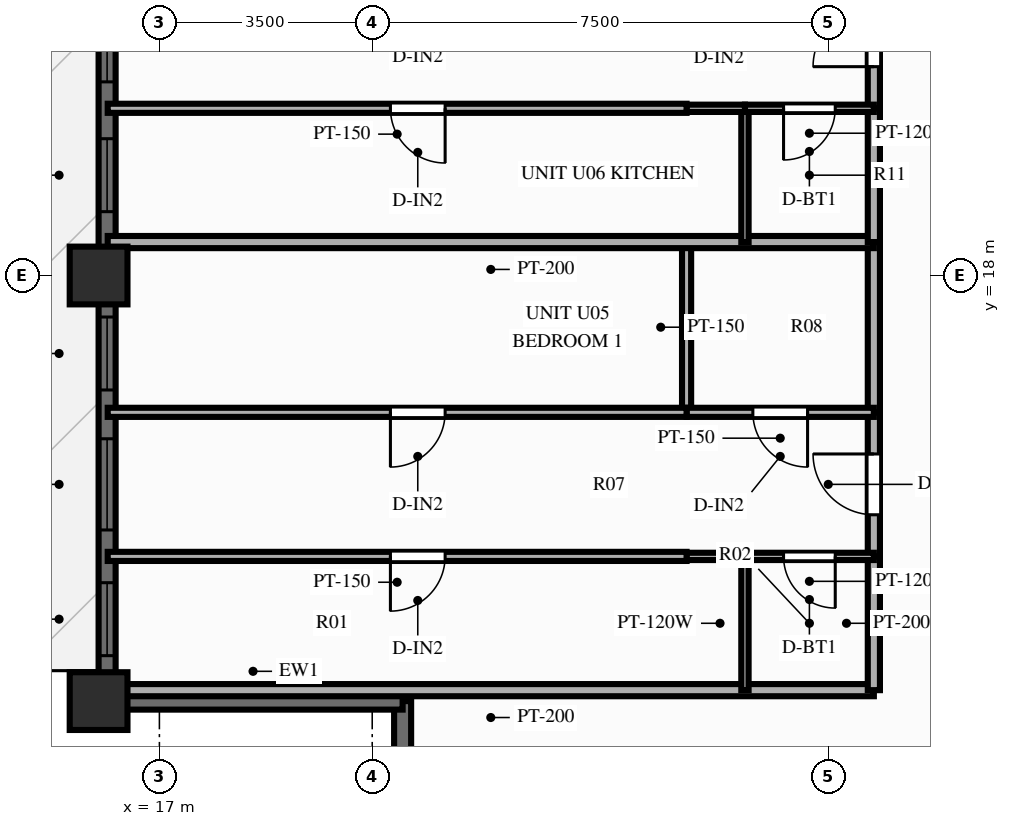
"""IFC4 building model, lengths in metres.
Left out: names, types, materials, properties, quantities, classifications, styles, units other than length and angle.
Written with IfcOpenShell. Run it as: python <this file> out.ifc"""

import sys

from ifc_helpers import new_model, si_unit, direction, frame, frame_2d, origin, origin_2d, place, context, subcontext, project, spatial, rectangle, extrude, source, transform, mapped, element, fill, save


model = new_model("IFC4")
c1 = context("Model", 3, precision=1e-05, world=origin(), true_north=direction((0.0, 1.0)))
c2 = subcontext(c1, "Body", "Model", "MODEL_VIEW")
j1 = project(units=[si_unit("LENGTHUNIT", "METRE"), si_unit("PLANEANGLEUNIT", "RADIAN")], contexts=[c1])
p1 = place(None, origin())
s1 = spatial("IfcSite", under=j1, at=p1, CompositionType="ELEMENT")
p2 = place(p1, origin())
s2 = spatial("IfcBuilding", under=s1, at=p2, CompositionType="ELEMENT")
p3 = place(p2, frame((0.0, 0.0, 159.1)))
s3 = spatial("IfcBuildingStorey", under=s2, at=p3, CompositionType="ELEMENT", Elevation=159.1)
m1 = source(origin(), c2, "Body", "SweptSolid", [
    extrude(rectangle(XDim=0.95, YDim=0.95, at=origin_2d()), origin(), (0.0, 0.0, 1.0), 3.9),
])
for number, where, z_axis, x_axis in (
    (1, (16.0, 18.0, 0.0), (0.0, 0.0, 1.0), (1.0, 0.0, 0.0)),
    (2, (16.0, 11.0, 0.0), (0.0, 0.0, 1.0), (1.0, 0.0, 0.0)),
):
    element("IfcColumn", number, at=place(p3, frame(where, z_axis=z_axis, x_axis=x_axis)), inside=s3, PredefinedType="COLUMN", context=c2, shape_type="MappedRepresentation", body=[
        mapped(m1, transform((0.0, 0.0, 0.0), scale=1.0)),
    ])
p4 = place(p3, frame((16.14, 11.0, 0.0), z_axis=(0.0, 0.0, 1.0), x_axis=(0.0, 1.0, 0.0)))
e3 = element("IfcWall", 3, at=p4, inside=s3, PredefinedType="SOLIDWALL", context=c2, shape_type="SweptSolid", body=[
    extrude(rectangle(XDim=32.0, YDim=0.28, at=frame_2d((16.0, 0.0))), origin(), (0.0, 0.0, 1.0), 2.79),
])
p5 = place(p4, frame((0.748, 0.0, 0.85)))
e4 = element("IfcOpeningElement", 4, at=p5, cuts=e3, PredefinedType="OPENING", context=c2, shape_type="SweptSolid", body=[
    extrude(rectangle(XDim=1.2, YDim=1.5, at=frame_2d((0.6, 0.75))), frame((0.0, 0.152, 0.0), z_axis=(0.0, -1.0, 0.0), x_axis=(1.0, 0.0, 0.0)), (0.0, 0.0, 1.0), 0.304),
])
p6 = place(p4, frame((2.815, 0.0, 0.85)))
e5 = element("IfcOpeningElement", 5, at=p6, cuts=e3, PredefinedType="OPENING", context=c2, shape_type="SweptSolid", body=[
    extrude(rectangle(XDim=1.5, YDim=1.65, at=frame_2d((0.75, 0.825))), frame((0.0, 0.152, 0.0), z_axis=(0.0, -1.0, 0.0), x_axis=(1.0, 0.0, 0.0)), (0.0, 0.0, 1.0), 0.304),
])
p7 = place(p4, frame((5.117, 0.0, 0.85)))
e6 = element("IfcOpeningElement", 6, at=p7, cuts=e3, PredefinedType="OPENING", context=c2, shape_type="SweptSolid", body=[
    extrude(rectangle(XDim=1.2, YDim=1.5, at=frame_2d((0.6, 0.75))), frame((0.0, 0.152, 0.0), z_axis=(0.0, -1.0, 0.0), x_axis=(1.0, 0.0, 0.0)), (0.0, 0.0, 1.0), 0.304),
])
p8 = place(p4, frame((8.05, 0.0, 0.85)))
e7 = element("IfcOpeningElement", 7, at=p8, cuts=e3, PredefinedType="OPENING", context=c2, shape_type="SweptSolid", body=[
    extrude(rectangle(XDim=1.2, YDim=1.5, at=frame_2d((0.6, 0.75))), frame((0.0, 0.152, 0.0), z_axis=(0.0, -1.0, 0.0), x_axis=(1.0, 0.0, 0.0)), (0.0, 0.0, 1.0), 0.304),
])
p9 = place(p4, frame((10.185, 0.0, 0.85)))
e8 = element("IfcOpeningElement", 8, at=p9, cuts=e3, PredefinedType="OPENING", context=c2, shape_type="SweptSolid", body=[
    extrude(rectangle(XDim=1.5, YDim=1.65, at=frame_2d((0.75, 0.825))), frame((0.0, 0.152, 0.0), z_axis=(0.0, -1.0, 0.0), x_axis=(1.0, 0.0, 0.0)), (0.0, 0.0, 1.0), 0.304),
])
p10 = place(p4, frame((12.72, 0.0, 0.0)))
e9 = element("IfcOpeningElement", 9, at=p10, cuts=e3, PredefinedType="OPENING", context=c2, shape_type="SweptSolid", body=[
    extrude(rectangle(XDim=1.6, YDim=2.15, at=frame_2d((0.8, 1.075))), frame((0.0, 0.152, 0.0), z_axis=(0.0, -1.0, 0.0), x_axis=(1.0, 0.0, 0.0)), (0.0, 0.0, 1.0), 0.304),
])
p11 = place(p4, frame((15.4, 0.0, 0.85)))
e10 = element("IfcOpeningElement", 10, at=p11, cuts=e3, PredefinedType="OPENING", context=c2, shape_type="SweptSolid", body=[
    extrude(rectangle(XDim=1.2, YDim=1.5, at=frame_2d((0.6, 0.75))), frame((0.0, 0.152, 0.0), z_axis=(0.0, -1.0, 0.0), x_axis=(1.0, 0.0, 0.0)), (0.0, 0.0, 1.0), 0.304),
])
p12 = place(p4, frame((17.58, 0.0, 0.85)))
e11 = element("IfcOpeningElement", 11, at=p12, cuts=e3, PredefinedType="OPENING", context=c2, shape_type="SweptSolid", body=[
    extrude(rectangle(XDim=1.2, YDim=1.5, at=frame_2d((0.6, 0.75))), frame((0.0, 0.152, 0.0), z_axis=(0.0, -1.0, 0.0), x_axis=(1.0, 0.0, 0.0)), (0.0, 0.0, 1.0), 0.304),
])
p13 = place(p4, frame((19.715, 0.0, 0.85)))
e12 = element("IfcOpeningElement", 12, at=p13, cuts=e3, PredefinedType="OPENING", context=c2, shape_type="SweptSolid", body=[
    extrude(rectangle(XDim=1.5, YDim=1.65, at=frame_2d((0.75, 0.825))), frame((0.0, 0.152, 0.0), z_axis=(0.0, -1.0, 0.0), x_axis=(1.0, 0.0, 0.0)), (0.0, 0.0, 1.0), 0.304),
])
p14 = place(p4, frame((22.15, 0.0, 0.85)))
e13 = element("IfcOpeningElement", 13, at=p14, cuts=e3, PredefinedType="OPENING", context=c2, shape_type="SweptSolid", body=[
    extrude(rectangle(XDim=1.8, YDim=1.65, at=frame_2d((0.9, 0.825))), frame((0.0, 0.152, 0.0), z_axis=(0.0, -1.0, 0.0), x_axis=(1.0, 0.0, 0.0)), (0.0, 0.0, 1.0), 0.304),
])
p15 = place(p4, frame((25.633, 0.0, 0.85)))
e14 = element("IfcOpeningElement", 14, at=p15, cuts=e3, PredefinedType="OPENING", context=c2, shape_type="SweptSolid", body=[
    extrude(rectangle(XDim=0.7, YDim=1.5, at=frame_2d((0.35, 0.75))), frame((0.0, 0.152, 0.0), z_axis=(0.0, -1.0, 0.0), x_axis=(1.0, 0.0, 0.0)), (0.0, 0.0, 1.0), 0.304),
])
p16 = place(p4, frame((27.085, 0.0, 0.85)))
e15 = element("IfcOpeningElement", 15, at=p16, cuts=e3, PredefinedType="OPENING", context=c2, shape_type="SweptSolid", body=[
    extrude(rectangle(XDim=1.5, YDim=1.65, at=frame_2d((0.75, 0.825))), frame((0.0, 0.152, 0.0), z_axis=(0.0, -1.0, 0.0), x_axis=(1.0, 0.0, 0.0)), (0.0, 0.0, 1.0), 0.304),
])
p17 = place(p4, frame((29.602, 0.0, 0.85)))
e16 = element("IfcOpeningElement", 16, at=p17, cuts=e3, PredefinedType="OPENING", context=c2, shape_type="SweptSolid", body=[
    extrude(rectangle(XDim=1.5, YDim=1.65, at=frame_2d((0.75, 0.825))), frame((0.0, 0.152, 0.0), z_axis=(0.0, -1.0, 0.0), x_axis=(1.0, 0.0, 0.0)), (0.0, 0.0, 1.0), 0.304),
])
for number, where, z_axis, x_axis in (
    (17, (21.0, 6.08, 0.0), (0.0, 0.0, 1.0), (0.0, 1.0, 0.0)),
    (18, (16.08, 11.0, 0.0), (0.0, 0.0, 1.0), (1.0, 0.0, 0.0)),
):
    element("IfcWall", number, at=place(p3, frame(where, z_axis=z_axis, x_axis=x_axis)), inside=s3, PredefinedType="SOLIDWALL", context=c2, shape_type="SweptSolid", body=[
        extrude(rectangle(XDim=4.92, YDim=0.28, at=frame_2d((2.46, 0.0))), origin(), (0.0, 0.0, 1.0), 2.79),
    ])
p18 = place(p3, frame((28.75, 11.18, 0.0), z_axis=(0.0, 0.0, 1.0), x_axis=(-1.0, 0.0, 0.0)))
e19 = element("IfcWall", 19, at=p18, inside=s3, PredefinedType="PARTITIONING", context=c2, shape_type="SweptSolid", body=[
    extrude(rectangle(XDim=12.6, YDim=0.2, at=frame_2d((6.3, 0.0))), origin(), (0.0, 0.0, 1.0), 3.69),
])
p19 = place(p3, frame((28.75, 11.18, 0.0), z_axis=(0.0, 0.0, 1.0), x_axis=(0.0, 1.0, 0.0)))
e20 = element("IfcWall", 20, at=p19, inside=s3, PredefinedType="PARTITIONING", context=c2, shape_type="SweptSolid", body=[
    extrude(rectangle(XDim=2.2, YDim=0.2, at=frame_2d((1.1, 0.0))), origin(), (0.0, 0.0, 1.0), 3.69),
])
p20 = place(p3, frame((28.75, 13.38, 0.0), z_axis=(0.0, 0.0, 1.0), x_axis=(0.0, 1.0, 0.0)))
e21 = element("IfcWall", 21, at=p20, inside=s3, PredefinedType="PARTITIONING", context=c2, shape_type="SweptSolid", body=[
    extrude(rectangle(XDim=2.37, YDim=0.2, at=frame_2d((1.185, 0.0))), origin(), (0.0, 0.0, 1.0), 3.69),
])
p21 = place(p20, frame((0.685, 0.0, 0.0)))
e22 = element("IfcOpeningElement", 22, at=p21, cuts=e21, PredefinedType="OPENING", context=c2, shape_type="SweptSolid", body=[
    extrude(rectangle(XDim=1.0, YDim=2.15, at=frame_2d((0.5, 1.075))), frame((0.0, 0.112, 0.0), z_axis=(0.0, -1.0, 0.0), x_axis=(1.0, 0.0, 0.0)), (0.0, 0.0, 1.0), 0.224),
])
p22 = place(p3, frame((28.75, 15.75, 0.0), z_axis=(0.0, 0.0, 1.0), x_axis=(0.0, 1.0, 0.0)))
e23 = element("IfcWall", 23, at=p22, inside=s3, PredefinedType="PARTITIONING", context=c2, shape_type="SweptSolid", body=[
    extrude(rectangle(XDim=2.801, YDim=0.2, at=frame_2d((1.4, 0.0))), origin(), (0.0, 0.0, 1.0), 3.69),
])
p23 = place(p3, frame((26.63, 11.18, 0.0), z_axis=(0.0, 0.0, 1.0), x_axis=(0.0, 1.0, 0.0)))
e24 = element("IfcWall", 24, at=p23, inside=s3, PredefinedType="PARTITIONING", context=c2, shape_type="SweptSolid", body=[
    extrude(rectangle(XDim=2.2, YDim=0.12, at=frame_2d((1.1, 0.0))), origin(), (0.0, 0.0, 1.0), 3.69),
])
p24 = place(p3, frame((25.67, 15.75, 0.0), z_axis=(0.0, 0.0, 1.0), x_axis=(0.0, 1.0, 0.0)))
e25 = element("IfcWall", 25, at=p24, inside=s3, PredefinedType="PARTITIONING", context=c2, shape_type="SweptSolid", body=[
    extrude(rectangle(XDim=2.801, YDim=0.15, at=frame_2d((1.4, 0.0))), origin(), (0.0, 0.0, 1.0), 3.69),
])
p25 = place(p3, frame((28.75, 13.38, 0.0), z_axis=(0.0, 0.0, 1.0), x_axis=(-1.0, 0.0, 0.0)))
e26 = element("IfcWall", 26, at=p25, inside=s3, PredefinedType="PARTITIONING", context=c2, shape_type="SweptSolid", body=[
    extrude(rectangle(XDim=2.12, YDim=0.12, at=frame_2d((1.06, 0.0))), origin(), (0.0, 0.0, 1.0), 3.69),
])
p26 = place(p25, frame((0.635, 0.0, 0.0)))
e27 = element("IfcOpeningElement", 27, at=p26, cuts=e26, PredefinedType="OPENING", context=c2, shape_type="SweptSolid", body=[
    extrude(rectangle(XDim=0.85, YDim=2.05, at=frame_2d((0.425, 1.025))), frame((0.0, 0.072, 0.0), z_axis=(0.0, -1.0, 0.0), x_axis=(1.0, 0.0, 0.0)), (0.0, 0.0, 1.0), 0.144),
])
p27 = place(p3, frame((26.63, 13.38, 0.0), z_axis=(0.0, 0.0, 1.0), x_axis=(-1.0, 0.0, 0.0)))
e28 = element("IfcWall", 28, at=p27, inside=s3, PredefinedType="PARTITIONING", context=c2, shape_type="SweptSolid", body=[
    extrude(rectangle(XDim=0.96, YDim=0.12, at=frame_2d((0.48, 0.0))), origin(), (0.0, 0.0, 1.0), 3.69),
])
p28 = place(p3, frame((25.67, 13.38, 0.0), z_axis=(0.0, 0.0, 1.0), x_axis=(-1.0, 0.0, 0.0)))
e29 = element("IfcWall", 29, at=p28, inside=s3, PredefinedType="PARTITIONING", context=c2, shape_type="SweptSolid", body=[
    extrude(rectangle(XDim=9.52, YDim=0.15, at=frame_2d((4.76, 0.0))), origin(), (0.0, 0.0, 1.0), 3.69),
])
p29 = place(p28, frame((3.971, 0.0, 0.0)))
e30 = element("IfcOpeningElement", 30, at=p29, cuts=e29, PredefinedType="OPENING", context=c2, shape_type="SweptSolid", body=[
    extrude(rectangle(XDim=0.9, YDim=2.1, at=frame_2d((0.45, 1.05))), frame((0.0, 0.087, 0.0), z_axis=(0.0, -1.0, 0.0), x_axis=(1.0, 0.0, 0.0)), (0.0, 0.0, 1.0), 0.174),
])
p30 = place(p3, frame((28.75, 15.75, 0.0), z_axis=(0.0, 0.0, 1.0), x_axis=(-1.0, 0.0, 0.0)))
e31 = element("IfcWall", 31, at=p30, inside=s3, PredefinedType="PARTITIONING", context=c2, shape_type="SweptSolid", body=[
    extrude(rectangle(XDim=3.08, YDim=0.15, at=frame_2d((1.54, 0.0))), origin(), (0.0, 0.0, 1.0), 3.69),
])
p31 = place(p30, frame((1.09, 0.0, 0.0)))
e32 = element("IfcOpeningElement", 32, at=p31, cuts=e31, PredefinedType="OPENING", context=c2, shape_type="SweptSolid", body=[
    extrude(rectangle(XDim=0.9, YDim=2.1, at=frame_2d((0.45, 1.05))), frame((0.0, 0.087, 0.0), z_axis=(0.0, -1.0, 0.0), x_axis=(1.0, 0.0, 0.0)), (0.0, 0.0, 1.0), 0.174),
])
p32 = place(p3, frame((25.67, 15.75, 0.0), z_axis=(0.0, 0.0, 1.0), x_axis=(-1.0, 0.0, 0.0)))
e33 = element("IfcWall", 33, at=p32, inside=s3, PredefinedType="PARTITIONING", context=c2, shape_type="SweptSolid", body=[
    extrude(rectangle(XDim=9.52, YDim=0.15, at=frame_2d((4.76, 0.0))), origin(), (0.0, 0.0, 1.0), 3.69),
])
p33 = place(p32, frame((3.971, 0.0, 0.0)))
e34 = element("IfcOpeningElement", 34, at=p33, cuts=e33, PredefinedType="OPENING", context=c2, shape_type="SweptSolid", body=[
    extrude(rectangle(XDim=0.9, YDim=2.1, at=frame_2d((0.45, 1.05))), frame((0.0, 0.087, 0.0), z_axis=(0.0, -1.0, 0.0), x_axis=(1.0, 0.0, 0.0)), (0.0, 0.0, 1.0), 0.174),
])
p34 = place(p3, frame((28.75, 18.55, 0.0), z_axis=(0.0, 0.0, 1.0), x_axis=(-1.0, 0.0, 0.0)))
e35 = element("IfcWall", 35, at=p34, inside=s3, PredefinedType="PARTITIONING", context=c2, shape_type="SweptSolid", body=[
    extrude(rectangle(XDim=12.6, YDim=0.2, at=frame_2d((6.3, 0.0))), origin(), (0.0, 0.0, 1.0), 3.69),
])
p35 = place(p3, frame((28.75, 18.55, 0.0), z_axis=(0.0, 0.0, 1.0), x_axis=(0.0, 1.0, 0.0)))
e36 = element("IfcWall", 36, at=p35, inside=s3, PredefinedType="PARTITIONING", context=c2, shape_type="SweptSolid", body=[
    extrude(rectangle(XDim=2.2, YDim=0.2, at=frame_2d((1.1, 0.0))), origin(), (0.0, 0.0, 1.0), 3.69),
])
p36 = place(p3, frame((28.75, 20.75, 0.0), z_axis=(0.0, 0.0, 1.0), x_axis=(0.0, 1.0, 0.0)))
e37 = element("IfcWall", 37, at=p36, inside=s3, PredefinedType="PARTITIONING", context=c2, shape_type="SweptSolid", body=[
    extrude(rectangle(XDim=2.369, YDim=0.2, at=frame_2d((1.185, 0.0))), origin(), (0.0, 0.0, 1.0), 3.69),
])
p37 = place(p36, frame((0.685, 0.0, 0.0)))
e38 = element("IfcOpeningElement", 38, at=p37, cuts=e37, PredefinedType="OPENING", context=c2, shape_type="SweptSolid", body=[
    extrude(rectangle(XDim=1.0, YDim=2.15, at=frame_2d((0.5, 1.075))), frame((0.0, 0.112, 0.0), z_axis=(0.0, -1.0, 0.0), x_axis=(1.0, 0.0, 0.0)), (0.0, 0.0, 1.0), 0.224),
])
p38 = place(p3, frame((26.63, 18.55, 0.0), z_axis=(0.0, 0.0, 1.0), x_axis=(0.0, 1.0, 0.0)))
e39 = element("IfcWall", 39, at=p38, inside=s3, PredefinedType="PARTITIONING", context=c2, shape_type="SweptSolid", body=[
    extrude(rectangle(XDim=2.2, YDim=0.12, at=frame_2d((1.1, 0.0))), origin(), (0.0, 0.0, 1.0), 3.69),
])
p39 = place(p3, frame((28.75, 20.75, 0.0), z_axis=(0.0, 0.0, 1.0), x_axis=(-1.0, 0.0, 0.0)))
e40 = element("IfcWall", 40, at=p39, inside=s3, PredefinedType="PARTITIONING", context=c2, shape_type="SweptSolid", body=[
    extrude(rectangle(XDim=2.12, YDim=0.12, at=frame_2d((1.06, 0.0))), origin(), (0.0, 0.0, 1.0), 3.69),
])
p40 = place(p39, frame((0.635, 0.0, 0.0)))
e41 = element("IfcOpeningElement", 41, at=p40, cuts=e40, PredefinedType="OPENING", context=c2, shape_type="SweptSolid", body=[
    extrude(rectangle(XDim=0.85, YDim=2.05, at=frame_2d((0.425, 1.025))), frame((0.0, 0.072, 0.0), z_axis=(0.0, -1.0, 0.0), x_axis=(1.0, 0.0, 0.0)), (0.0, 0.0, 1.0), 0.144),
])
p41 = place(p3, frame((26.63, 20.75, 0.0), z_axis=(0.0, 0.0, 1.0), x_axis=(-1.0, 0.0, 0.0)))
e42 = element("IfcWall", 42, at=p41, inside=s3, PredefinedType="PARTITIONING", context=c2, shape_type="SweptSolid", body=[
    extrude(rectangle(XDim=0.96, YDim=0.12, at=frame_2d((0.48, 0.0))), origin(), (0.0, 0.0, 1.0), 3.69),
])
p42 = place(p3, frame((25.67, 20.75, 0.0), z_axis=(0.0, 0.0, 1.0), x_axis=(-1.0, 0.0, 0.0)))
e43 = element("IfcWall", 43, at=p42, inside=s3, PredefinedType="PARTITIONING", context=c2, shape_type="SweptSolid", body=[
    extrude(rectangle(XDim=9.52, YDim=0.15, at=frame_2d((4.76, 0.0))), origin(), (0.0, 0.0, 1.0), 3.69),
])
p43 = place(p42, frame((3.971, 0.0, 0.0)))
e44 = element("IfcOpeningElement", 44, at=p43, cuts=e43, PredefinedType="OPENING", context=c2, shape_type="SweptSolid", body=[
    extrude(rectangle(XDim=0.9, YDim=2.1, at=frame_2d((0.45, 1.05))), frame((0.0, 0.087, 0.0), z_axis=(0.0, -1.0, 0.0), x_axis=(1.0, 0.0, 0.0)), (0.0, 0.0, 1.0), 0.174),
])
m2 = source(origin(), c2, "Body", "SweptSolid", [
    extrude(rectangle(XDim=1.2, YDim=1.5, at=frame_2d((0.6, 0.75))), frame((0.0, 0.03, 0.0), z_axis=(0.0, -1.0, 0.0), x_axis=(1.0, 0.0, 0.0)), (0.0, 0.0, 1.0), 0.06),
])
p44 = place(p5, origin())
e45 = element("IfcWindow", 45, at=p44, inside=s3, PartitioningType="SINGLE_PANEL", PredefinedType="WINDOW", context=c2, shape_type="MappedRepresentation", body=[
    mapped(m2, transform((0.0, 0.0, 0.0), scale=1.0)),
])
fill(e4, e45)
m3 = source(origin(), c2, "Body", "SweptSolid", [
    extrude(rectangle(XDim=1.5, YDim=1.65, at=frame_2d((0.75, 0.825))), frame((0.0, 0.03, 0.0), z_axis=(0.0, -1.0, 0.0), x_axis=(1.0, 0.0, 0.0)), (0.0, 0.0, 1.0), 0.06),
])
p45 = place(p6, origin())
e46 = element("IfcWindow", 46, at=p45, inside=s3, PartitioningType="SINGLE_PANEL", PredefinedType="WINDOW", context=c2, shape_type="MappedRepresentation", body=[
    mapped(m3, transform((0.0, 0.0, 0.0), scale=1.0)),
])
fill(e5, e46)
p46 = place(p7, origin())
e47 = element("IfcWindow", 47, at=p46, inside=s3, PartitioningType="SINGLE_PANEL", PredefinedType="WINDOW", context=c2, shape_type="MappedRepresentation", body=[
    mapped(m2, transform((0.0, 0.0, 0.0), scale=1.0)),
])
fill(e6, e47)
p47 = place(p8, origin())
e48 = element("IfcWindow", 48, at=p47, inside=s3, PartitioningType="SINGLE_PANEL", PredefinedType="WINDOW", context=c2, shape_type="MappedRepresentation", body=[
    mapped(m2, transform((0.0, 0.0, 0.0), scale=1.0)),
])
fill(e7, e48)
p48 = place(p9, origin())
e49 = element("IfcWindow", 49, at=p48, inside=s3, PartitioningType="SINGLE_PANEL", PredefinedType="WINDOW", context=c2, shape_type="MappedRepresentation", body=[
    mapped(m3, transform((0.0, 0.0, 0.0), scale=1.0)),
])
fill(e8, e49)
m4 = source(origin(), c2, "Body", "SweptSolid", [
    extrude(rectangle(XDim=1.0, YDim=2.15, at=frame_2d((0.5, 1.075))), frame((0.0, 0.025, 0.0), z_axis=(0.0, -1.0, 0.0), x_axis=(1.0, 0.0, 0.0)), (0.0, 0.0, 1.0), 0.05),
])
p49 = place(p21, origin())
e50 = element("IfcDoor", 50, at=p49, inside=s3, OperationType="SINGLE_SWING_RIGHT", PredefinedType="DOOR", context=c2, shape_type="MappedRepresentation", body=[
    mapped(m4, transform((0.0, 0.0, 0.0), scale=1.0)),
])
fill(e22, e50)
m5 = source(origin(), c2, "Body", "SweptSolid", [
    extrude(rectangle(XDim=0.85, YDim=2.05, at=frame_2d((0.425, 1.025))), frame((0.0, 0.025, 0.0), z_axis=(0.0, -1.0, 0.0), x_axis=(1.0, 0.0, 0.0)), (0.0, 0.0, 1.0), 0.05),
])
p50 = place(p26, origin())
e51 = element("IfcDoor", 51, at=p50, inside=s3, OperationType="SINGLE_SWING_LEFT", PredefinedType="DOOR", context=c2, shape_type="MappedRepresentation", body=[
    mapped(m5, transform((0.0, 0.0, 0.0), scale=1.0)),
])
fill(e27, e51)
m6 = source(origin(), c2, "Body", "SweptSolid", [
    extrude(rectangle(XDim=0.9, YDim=2.1, at=frame_2d((0.45, 1.05))), frame((0.0, 0.025, 0.0), z_axis=(0.0, -1.0, 0.0), x_axis=(1.0, 0.0, 0.0)), (0.0, 0.0, 1.0), 0.05),
])
p51 = place(p29, origin())
e52 = element("IfcDoor", 52, at=p51, inside=s3, OperationType="SINGLE_SWING_RIGHT", PredefinedType="DOOR", context=c2, shape_type="MappedRepresentation", body=[
    mapped(m6, transform((0.0, 0.0, 0.0), scale=1.0)),
])
fill(e30, e52)
p52 = place(p31, origin())
e53 = element("IfcDoor", 53, at=p52, inside=s3, OperationType="SINGLE_SWING_LEFT", PredefinedType="DOOR", context=c2, shape_type="MappedRepresentation", body=[
    mapped(m6, transform((0.0, 0.0, 0.0), scale=1.0)),
])
fill(e32, e53)
p53 = place(p33, origin())
e54 = element("IfcDoor", 54, at=p53, inside=s3, OperationType="SINGLE_SWING_RIGHT", PredefinedType="DOOR", context=c2, shape_type="MappedRepresentation", body=[
    mapped(m6, transform((0.0, 0.0, 0.0), scale=1.0)),
])
fill(e34, e54)
p54 = place(p37, origin())
e55 = element("IfcDoor", 55, at=p54, inside=s3, OperationType="SINGLE_SWING_LEFT", PredefinedType="DOOR", context=c2, shape_type="MappedRepresentation", body=[
    mapped(m4, transform((0.0, 0.0, 0.0), scale=1.0)),
])
fill(e38, e55)
p55 = place(p40, origin())
e56 = element("IfcDoor", 56, at=p55, inside=s3, OperationType="SINGLE_SWING_RIGHT", PredefinedType="DOOR", context=c2, shape_type="MappedRepresentation", body=[
    mapped(m5, transform((0.0, 0.0, 0.0), scale=1.0)),
])
fill(e41, e56)
p56 = place(p43, origin())
e57 = element("IfcDoor", 57, at=p56, inside=s3, OperationType="SINGLE_SWING_LEFT", PredefinedType="DOOR", context=c2, shape_type="MappedRepresentation", body=[
    mapped(m6, transform((0.0, 0.0, 0.0), scale=1.0)),
])
fill(e44, e57)
save(model, sys.argv[1])
